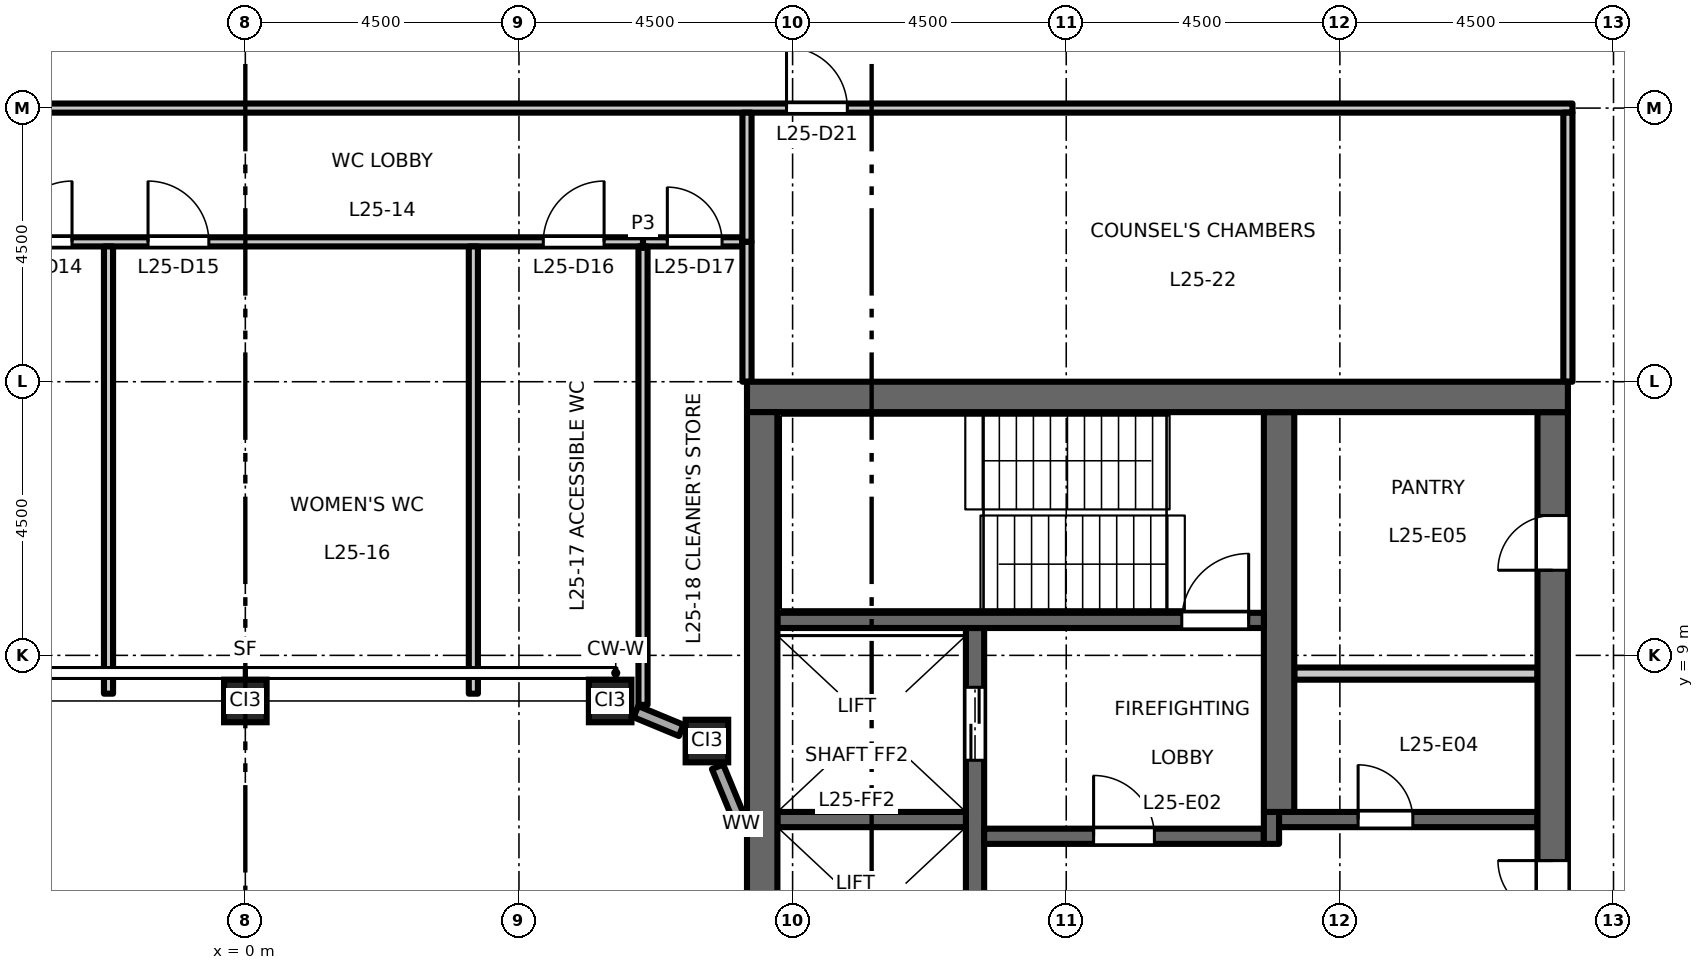
"""IFC4 building model, lengths in metres.
Left out: names, types, materials, properties, quantities, classifications, styles, units other than length and angle.
Written with IfcOpenShell. Run it as: python <this file> out.ifc"""

import sys

from ifc_helpers import new_model, si_unit, direction, frame, frame_2d, origin, origin_2d, place, context, subcontext, project, spatial, rectangle, hollow_rectangle, extrude, element, fill, save


model = new_model("IFC4")
c1 = context("Model", 3, precision=1e-05, world=origin(), true_north=direction((0.0, 1.0)))
c2 = subcontext(c1, "Body", "Model", "MODEL_VIEW")
j1 = project(units=[si_unit("LENGTHUNIT", "METRE"), si_unit("PLANEANGLEUNIT", "RADIAN")], contexts=[c1])
p1 = place(None, origin())
s1 = spatial("IfcSite", under=j1, at=p1, CompositionType="ELEMENT")
p2 = place(p1, origin())
s2 = spatial("IfcBuilding", under=s1, at=p2, CompositionType="ELEMENT")
p3 = place(p2, frame((0.0, 0.0, 118.2)))
s3 = spatial("IfcBuildingStorey", under=s2, at=p3, CompositionType="ELEMENT", Elevation=118.2)
for number, where, z_axis, x_axis in (
    (1, (0.0, 8.25, 0.0), (0.0, 0.0, 1.0), (1.0, 0.0, 0.0)),
    (2, (6.0, 8.25, 0.0), (0.0, 0.0, 1.0), (1.0, 0.0, 0.0)),
    (3, (7.591, 7.591, 0.0), (0.0, 0.0, 1.0), (1.0, 0.0, 0.0)),
):
    element("IfcColumn", number, at=place(p3, frame(where, z_axis=z_axis, x_axis=x_axis)), inside=s3, PredefinedType="COLUMN", context=c2, shape_type="SweptSolid", body=[
        extrude(hollow_rectangle(XDim=0.7, YDim=0.7, WallThickness=0.04, at=origin_2d()), origin(), (0.0, 0.0, 1.0), 4.5),
    ])
p4 = place(p3, frame((12.0, -9.45, 0.0), z_axis=(0.0, 0.0, 1.0), x_axis=(0.0, 1.0, 0.0)))
e4 = element("IfcWall", 4, at=p4, inside=s3, PredefinedType="SHEAR", context=c2, shape_type="SweptSolid", body=[
    extrude(rectangle(XDim=18.9, YDim=0.3, at=frame_2d((9.45, 0.0))), origin(), (0.0, 0.0, 1.0), 4.35),
])
p5 = place(p4, frame((3.625, 0.0, 0.0)))
e5 = element("IfcOpeningElement", 5, at=p5, cuts=e4, PredefinedType="OPENING", context=c2, shape_type="SweptSolid", body=[
    extrude(rectangle(XDim=1.1, YDim=2.1, at=frame_2d((0.55, 1.05))), frame((0.0, 0.16, 0.0), z_axis=(0.0, -1.0, 0.0), x_axis=(1.0, 0.0, 0.0)), (0.0, 0.0, 1.0), 0.32),
])
p6 = place(p4, frame((6.775, 0.0, 0.0)))
e6 = element("IfcOpeningElement", 6, at=p6, cuts=e4, PredefinedType="OPENING", context=c2, shape_type="SweptSolid", body=[
    extrude(rectangle(XDim=1.1, YDim=2.1, at=frame_2d((0.55, 1.05))), frame((0.0, 0.16, 0.0), z_axis=(0.0, -1.0, 0.0), x_axis=(1.0, 0.0, 0.0)), (0.0, 0.0, 1.0), 0.32),
])
p7 = place(p4, frame((9.925, 0.0, 0.0)))
e7 = element("IfcOpeningElement", 7, at=p7, cuts=e4, PredefinedType="OPENING", context=c2, shape_type="SweptSolid", body=[
    extrude(rectangle(XDim=1.1, YDim=2.1, at=frame_2d((0.55, 1.05))), frame((0.0, 0.16, 0.0), z_axis=(0.0, -1.0, 0.0), x_axis=(1.0, 0.0, 0.0)), (0.0, 0.0, 1.0), 0.32),
])
p8 = place(p4, frame((13.075, 0.0, 0.0)))
e8 = element("IfcOpeningElement", 8, at=p8, cuts=e4, PredefinedType="OPENING", context=c2, shape_type="SweptSolid", body=[
    extrude(rectangle(XDim=1.1, YDim=2.1, at=frame_2d((0.55, 1.05))), frame((0.0, 0.16, 0.0), z_axis=(0.0, -1.0, 0.0), x_axis=(1.0, 0.0, 0.0)), (0.0, 0.0, 1.0), 0.32),
])
p9 = place(p4, frame((16.725, 0.0, 0.0)))
e9 = element("IfcOpeningElement", 9, at=p9, cuts=e4, PredefinedType="OPENING", context=c2, shape_type="SweptSolid", body=[
    extrude(rectangle(XDim=1.2, YDim=2.1, at=frame_2d((0.6, 1.05))), frame((0.0, 0.16, 0.0), z_axis=(0.0, -1.0, 0.0), x_axis=(1.0, 0.0, 0.0)), (0.0, 0.0, 1.0), 0.32),
])
p10 = place(p4, frame((0.975, 0.0, 0.0)))
e10 = element("IfcOpeningElement", 10, at=p10, cuts=e4, PredefinedType="OPENING", context=c2, shape_type="SweptSolid", body=[
    extrude(rectangle(XDim=1.2, YDim=2.1, at=frame_2d((0.6, 1.05))), frame((0.0, 0.16, 0.0), z_axis=(0.0, -1.0, 0.0), x_axis=(1.0, 0.0, 0.0)), (0.0, 0.0, 1.0), 0.32),
])
p11 = place(p3, frame((12.15, 6.025, 0.0), z_axis=(0.0, 0.0, 1.0), x_axis=(1.0, 0.0, 0.0)))
e11 = element("IfcWall", 11, at=p11, inside=s3, PredefinedType="SHEAR", context=c2, shape_type="SweptSolid", body=[
    extrude(rectangle(XDim=4.6, YDim=0.25, at=frame_2d((2.3, 0.0))), origin(), (0.0, 0.0, 1.0), 4.35),
])
p12 = place(p11, frame((1.8, 0.0, 0.0)))
e12 = element("IfcOpeningElement", 12, at=p12, cuts=e11, PredefinedType="OPENING", context=c2, shape_type="SweptSolid", body=[
    extrude(rectangle(XDim=1.0, YDim=2.1, at=frame_2d((0.5, 1.05))), frame((0.0, 0.135, 0.0), z_axis=(0.0, -1.0, 0.0), x_axis=(1.0, 0.0, 0.0)), (0.0, 0.0, 1.0), 0.27),
])
p13 = place(p3, frame((16.875, 5.9, 0.0), z_axis=(0.0, 0.0, 1.0), x_axis=(0.0, 1.0, 0.0)))
e13 = element("IfcWall", 13, at=p13, inside=s3, PredefinedType="SHEAR", context=c2, shape_type="SweptSolid", body=[
    extrude(rectangle(XDim=0.525, YDim=0.25, at=frame_2d((0.263, 0.0))), origin(), (0.0, 0.0, 1.0), 4.35),
])
p14 = place(p3, frame((17.0, 6.3, 0.0), z_axis=(0.0, 0.0, 1.0), x_axis=(1.0, 0.0, 0.0)))
e14 = element("IfcWall", 14, at=p14, inside=s3, PredefinedType="SHEAR", context=c2, shape_type="SweptSolid", body=[
    extrude(rectangle(XDim=4.25, YDim=0.25, at=frame_2d((2.125, 0.0))), origin(), (0.0, 0.0, 1.0), 4.35),
])
p15 = place(p14, frame((1.3, 0.0, 0.0)))
e15 = element("IfcOpeningElement", 15, at=p15, cuts=e14, PredefinedType="OPENING", context=c2, shape_type="SweptSolid", body=[
    extrude(rectangle(XDim=0.9, YDim=2.1, at=frame_2d((0.45, 1.05))), frame((0.0, 0.135, 0.0), z_axis=(0.0, -1.0, 0.0), x_axis=(1.0, 0.0, 0.0)), (0.0, 0.0, 1.0), 0.27),
])
p16 = place(p3, frame((21.5, -13.0, 0.0), z_axis=(0.0, 0.0, 1.0), x_axis=(0.0, 1.0, 0.0)))
e16 = element("IfcWall", 16, at=p16, inside=s3, PredefinedType="SHEAR", context=c2, shape_type="SweptSolid", body=[
    extrude(rectangle(XDim=26.0, YDim=0.5, at=frame_2d((13.0, 0.0))), origin(), (0.0, 0.0, 1.0), 4.35),
])
p17 = place(p16, frame((16.825, 0.0, 0.0)))
e17 = element("IfcOpeningElement", 17, at=p17, cuts=e16, PredefinedType="OPENING", context=c2, shape_type="SweptSolid", body=[
    extrude(rectangle(XDim=1.8, YDim=2.1, at=frame_2d((0.9, 1.05))), frame((0.0, 0.26, 0.0), z_axis=(0.0, -1.0, 0.0), x_axis=(1.0, 0.0, 0.0)), (0.0, 0.0, 1.0), 0.52),
])
p18 = place(p16, frame((7.375, 0.0, 0.0)))
e18 = element("IfcOpeningElement", 18, at=p18, cuts=e16, PredefinedType="OPENING", context=c2, shape_type="SweptSolid", body=[
    extrude(rectangle(XDim=1.8, YDim=2.1, at=frame_2d((0.9, 1.05))), frame((0.0, 0.26, 0.0), z_axis=(0.0, -1.0, 0.0), x_axis=(1.0, 0.0, 0.0)), (0.0, 0.0, 1.0), 0.52),
])
p19 = place(p16, frame((23.4, 0.0, 0.0)))
e19 = element("IfcOpeningElement", 19, at=p19, cuts=e16, PredefinedType="OPENING", context=c2, shape_type="SweptSolid", body=[
    extrude(rectangle(XDim=0.9, YDim=2.1, at=frame_2d((0.45, 1.05))), frame((0.0, 0.26, 0.0), z_axis=(0.0, -1.0, 0.0), x_axis=(1.0, 0.0, 0.0)), (0.0, 0.0, 1.0), 0.52),
])
p20 = place(p3, frame((17.25, 8.7, 0.0), z_axis=(0.0, 0.0, 1.0), x_axis=(1.0, 0.0, 0.0)))
e20 = element("IfcWall", 20, at=p20, inside=s3, PredefinedType="PARTITIONING", context=c2, shape_type="SweptSolid", body=[
    extrude(rectangle(XDim=4.0, YDim=0.2, at=frame_2d((2.0, 0.0))), origin(), (0.0, 0.0, 1.0), 4.35),
])
p21 = place(p3, frame((17.0, 6.425, 0.0), z_axis=(0.0, 0.0, 1.0), x_axis=(0.0, 1.0, 0.0)))
e21 = element("IfcWall", 21, at=p21, inside=s3, PredefinedType="SHEAR", context=c2, shape_type="SweptSolid", body=[
    extrude(rectangle(XDim=6.575, YDim=0.5, at=frame_2d((3.288, 0.0))), origin(), (0.0, 0.0, 1.0), 4.35),
])
p22 = place(p3, frame((8.75, 6.3, 0.0), z_axis=(0.0, 0.0, 1.0), x_axis=(1.0, 0.0, 0.0)))
e22 = element("IfcWall", 22, at=p22, inside=s3, PredefinedType="SHEAR", context=c2, shape_type="SweptSolid", body=[
    extrude(rectangle(XDim=3.1, YDim=0.25, at=frame_2d((1.55, 0.0))), origin(), (0.0, 0.0, 1.0), 4.35),
])
p23 = place(p3, frame((8.75, 9.575, 0.0), z_axis=(0.0, 0.0, 1.0), x_axis=(1.0, 0.0, 0.0)))
e23 = element("IfcWall", 23, at=p23, inside=s3, PredefinedType="SHEAR", context=c2, shape_type="SweptSolid", body=[
    extrude(rectangle(XDim=8.0, YDim=0.25, at=frame_2d((4.0, 0.0))), origin(), (0.0, 0.0, 1.0), 4.35),
])
p24 = place(p23, frame((6.65, 0.0, 0.0)))
e24 = element("IfcOpeningElement", 24, at=p24, cuts=e23, PredefinedType="OPENING", context=c2, shape_type="SweptSolid", body=[
    extrude(rectangle(XDim=1.1, YDim=2.1, at=frame_2d((0.55, 1.05))), frame((0.0, 0.135, 0.0), z_axis=(0.0, -1.0, 0.0), x_axis=(1.0, 0.0, 0.0)), (0.0, 0.0, 1.0), 0.27),
])
p25 = place(p3, frame((8.25, 13.25, 0.0), z_axis=(0.0, 0.0, 1.0), x_axis=(1.0, 0.0, 0.0)))
e25 = element("IfcWall", 25, at=p25, inside=s3, PredefinedType="SHEAR", context=c2, shape_type="SweptSolid", body=[
    extrude(rectangle(XDim=13.5, YDim=0.5, at=frame_2d((6.75, 0.0))), origin(), (0.0, 0.0, 1.0), 4.35),
])
p26 = place(p3, frame((8.5, -13.0, 0.0), z_axis=(0.0, 0.0, 1.0), x_axis=(0.0, 1.0, 0.0)))
e26 = element("IfcWall", 26, at=p26, inside=s3, PredefinedType="SHEAR", context=c2, shape_type="SweptSolid", body=[
    extrude(rectangle(XDim=26.0, YDim=0.5, at=frame_2d((13.0, 0.0))), origin(), (0.0, 0.0, 1.0), 4.35),
])
p27 = place(p3, frame((8.154, 6.231, 0.0), z_axis=(0.0, 0.0, 1.0), x_axis=(-0.382769662028, 0.923843810301, 0.0)))
e27 = element("IfcWall", 27, at=p27, inside=s3, PredefinedType="STANDARD", context=c2, shape_type="SweptSolid", body=[
    extrude(rectangle(XDim=1.015, YDim=0.2, at=frame_2d((0.507, 0.0))), origin(), (0.0, 0.0, 1.0), 3.826),
])
p28 = place(p3, frame((7.168, 7.766, 0.0), z_axis=(0.0, 0.0, 1.0), x_axis=(-0.923817771127, 0.382832503518, 0.0)))
e28 = element("IfcWall", 28, at=p28, inside=s3, PredefinedType="STANDARD", context=c2, shape_type="SweptSolid", body=[
    extrude(rectangle(XDim=0.807, YDim=0.2, at=frame_2d((0.404, 0.0))), origin(), (0.0, 0.0, 1.0), 3.826),
])
p29 = place(p3, frame((-8.175, 15.8, 0.0), z_axis=(0.0, 0.0, 1.0), x_axis=(1.0, 0.0, 0.0)))
e29 = element("IfcWall", 29, at=p29, inside=s3, PredefinedType="PARTITIONING", context=c2, shape_type="SweptSolid", body=[
    extrude(rectangle(XDim=14.715, YDim=0.15, at=frame_2d((7.357, 0.0))), origin(), (0.0, 0.0, 1.0), 4.35),
])
p30 = place(p29, frame((4.325, 0.0, 0.0)))
e30 = element("IfcOpeningElement", 30, at=p30, cuts=e29, PredefinedType="OPENING", context=c2, shape_type="SweptSolid", body=[
    extrude(rectangle(XDim=1.0, YDim=2.1, at=frame_2d((0.5, 1.05))), frame((0.0, 0.085, 0.0), z_axis=(0.0, -1.0, 0.0), x_axis=(1.0, 0.0, 0.0)), (0.0, 0.0, 1.0), 0.17),
])
p31 = place(p29, frame((6.575, 0.0, 0.0)))
e31 = element("IfcOpeningElement", 31, at=p31, cuts=e29, PredefinedType="OPENING", context=c2, shape_type="SweptSolid", body=[
    extrude(rectangle(XDim=1.0, YDim=2.1, at=frame_2d((0.5, 1.05))), frame((0.0, 0.085, 0.0), z_axis=(0.0, -1.0, 0.0), x_axis=(1.0, 0.0, 0.0)), (0.0, 0.0, 1.0), 0.17),
])
p32 = place(p29, frame((13.075, 0.0, 0.0)))
e32 = element("IfcOpeningElement", 32, at=p32, cuts=e29, PredefinedType="OPENING", context=c2, shape_type="SweptSolid", body=[
    extrude(rectangle(XDim=1.0, YDim=2.1, at=frame_2d((0.5, 1.05))), frame((0.0, 0.085, 0.0), z_axis=(0.0, -1.0, 0.0), x_axis=(1.0, 0.0, 0.0)), (0.0, 0.0, 1.0), 0.17),
])
p33 = place(p3, frame((6.54, 15.8, 0.0), z_axis=(0.0, 0.0, 1.0), x_axis=(1.0, 0.0, 0.0)))
e33 = element("IfcWall", 33, at=p33, inside=s3, PredefinedType="PARTITIONING", context=c2, shape_type="SweptSolid", body=[
    extrude(rectangle(XDim=1.635, YDim=0.15, at=frame_2d((0.817, 0.0))), origin(), (0.0, 0.0, 1.0), 4.35),
])
p34 = place(p33, frame((0.4, 0.0, 0.0)))
e34 = element("IfcOpeningElement", 34, at=p34, cuts=e33, PredefinedType="OPENING", context=c2, shape_type="SweptSolid", body=[
    extrude(rectangle(XDim=0.9, YDim=2.1, at=frame_2d((0.45, 1.05))), frame((0.0, 0.085, 0.0), z_axis=(0.0, -1.0, 0.0), x_axis=(1.0, 0.0, 0.0)), (0.0, 0.0, 1.0), 0.17),
])
p35 = place(p3, frame((-21.825, 18.0, 0.0), z_axis=(0.0, 0.0, 1.0), x_axis=(1.0, 0.0, 0.0)))
e35 = element("IfcWall", 35, at=p35, inside=s3, PredefinedType="PARTITIONING", context=c2, shape_type="SweptSolid", body=[
    extrude(rectangle(XDim=43.65, YDim=0.15, at=frame_2d((21.825, 0.0))), origin(), (0.0, 0.0, 1.0), 4.35),
])
p36 = place(p35, frame((14.225, 0.0, 0.0)))
e36 = element("IfcOpeningElement", 36, at=p36, cuts=e35, PredefinedType="OPENING", context=c2, shape_type="SweptSolid", body=[
    extrude(rectangle(XDim=1.0, YDim=2.1, at=frame_2d((0.5, 1.05))), frame((0.0, 0.085, 0.0), z_axis=(0.0, -1.0, 0.0), x_axis=(1.0, 0.0, 0.0)), (0.0, 0.0, 1.0), 0.17),
])
p37 = place(p35, frame((11.975, 0.0, 0.0)))
e37 = element("IfcOpeningElement", 37, at=p37, cuts=e35, PredefinedType="OPENING", context=c2, shape_type="SweptSolid", body=[
    extrude(rectangle(XDim=1.0, YDim=2.1, at=frame_2d((0.5, 1.05))), frame((0.0, 0.085, 0.0), z_axis=(0.0, -1.0, 0.0), x_axis=(1.0, 0.0, 0.0)), (0.0, 0.0, 1.0), 0.17),
])
p38 = place(p35, frame((30.725, 0.0, 0.0)))
e38 = element("IfcOpeningElement", 38, at=p38, cuts=e35, PredefinedType="OPENING", context=c2, shape_type="SweptSolid", body=[
    extrude(rectangle(XDim=1.0, YDim=2.1, at=frame_2d((0.5, 1.05))), frame((0.0, 0.085, 0.0), z_axis=(0.0, -1.0, 0.0), x_axis=(1.0, 0.0, 0.0)), (0.0, 0.0, 1.0), 0.17),
])
for number, where, z_axis, x_axis in (
    (39, (-2.25, 8.37, 0.0), (0.0, 0.0, 1.0), (0.0, 1.0, 0.0)),
    (40, (3.75, 8.37, 0.0), (0.0, 0.0, 1.0), (0.0, 1.0, 0.0)),
):
    element("IfcWall", number, at=place(p3, frame(where, z_axis=z_axis, x_axis=x_axis)), inside=s3, PredefinedType="PARTITIONING", context=c2, shape_type="SweptSolid", body=[
        extrude(rectangle(XDim=7.355, YDim=0.15, at=frame_2d((3.677, 0.0))), origin(), (0.0, 0.0, 1.0), 4.35),
    ])
p39 = place(p3, frame((6.54, 8.186, 0.0), z_axis=(0.0, 0.0, 1.0), x_axis=(0.0, 1.0, 0.0)))
e41 = element("IfcWall", 41, at=p39, inside=s3, PredefinedType="PARTITIONING", context=c2, shape_type="SweptSolid", body=[
    extrude(rectangle(XDim=7.539, YDim=0.15, at=frame_2d((3.77, 0.0))), origin(), (0.0, 0.0, 1.0), 4.35),
])
p40 = place(p3, frame((8.25, 15.8, 0.0), z_axis=(0.0, 0.0, 1.0), x_axis=(0.0, 1.0, 0.0)))
e42 = element("IfcWall", 42, at=p40, inside=s3, PredefinedType="PARTITIONING", context=c2, shape_type="SweptSolid", body=[
    extrude(rectangle(XDim=2.125, YDim=0.15, at=frame_2d((1.062, 0.0))), origin(), (0.0, 0.0, 1.0), 4.35),
])
p41 = place(p3, frame((8.25, 13.5, 0.0), z_axis=(0.0, 0.0, 1.0), x_axis=(0.0, 1.0, 0.0)))
e43 = element("IfcWall", 43, at=p41, inside=s3, PredefinedType="PARTITIONING", context=c2, shape_type="SweptSolid", body=[
    extrude(rectangle(XDim=2.3, YDim=0.15, at=frame_2d((1.15, 0.0))), origin(), (0.0, 0.0, 1.0), 4.35),
])
p42 = place(p3, frame((21.75, 13.5, 0.0), z_axis=(0.0, 0.0, 1.0), x_axis=(0.0, 1.0, 0.0)))
e44 = element("IfcWall", 44, at=p42, inside=s3, PredefinedType="PARTITIONING", context=c2, shape_type="SweptSolid", body=[
    extrude(rectangle(XDim=4.425, YDim=0.15, at=frame_2d((2.212, 0.0))), origin(), (0.0, 0.0, 1.0), 4.35),
])
p43 = place(p12, origin())
e45 = element("IfcDoor", 45, at=p43, inside=s3, OperationType="SINGLE_SWING_RIGHT", PredefinedType="DOOR", context=c2, shape_type="SweptSolid", body=[
    extrude(rectangle(XDim=1.0, YDim=2.1, at=frame_2d((0.5, 1.05))), frame((0.0, 0.025, 0.0), z_axis=(0.0, -1.0, 0.0), x_axis=(1.0, 0.0, 0.0)), (0.0, 0.0, 1.0), 0.05),
])
fill(e12, e45)
p44 = place(p24, origin())
e46 = element("IfcDoor", 46, at=p44, inside=s3, OperationType="SINGLE_SWING_LEFT", PredefinedType="DOOR", context=c2, shape_type="SweptSolid", body=[
    extrude(rectangle(XDim=1.1, YDim=2.1, at=frame_2d((0.55, 1.05))), frame((0.0, 0.025, 0.0), z_axis=(0.0, -1.0, 0.0), x_axis=(1.0, 0.0, 0.0)), (0.0, 0.0, 1.0), 0.05),
])
fill(e24, e46)
p45 = place(p17, origin())
e47 = element("IfcDoor", 47, at=p45, inside=s3, OperationType="DOUBLE_DOOR_DOUBLE_SWING", PredefinedType="DOOR", context=c2, shape_type="SweptSolid", body=[
    extrude(rectangle(XDim=1.8, YDim=2.1, at=frame_2d((0.9, 1.05))), frame((0.0, 0.025, 0.0), z_axis=(0.0, -1.0, 0.0), x_axis=(1.0, 0.0, 0.0)), (0.0, 0.0, 1.0), 0.05),
])
fill(e17, e47)
p46 = place(p9, origin())
e48 = element("IfcDoor", 48, at=p46, inside=s3, OperationType="DOUBLE_DOOR_SLIDING", PredefinedType="DOOR", context=c2, shape_type="SweptSolid", body=[
    extrude(rectangle(XDim=1.2, YDim=2.1, at=frame_2d((0.6, 1.05))), frame((0.0, 0.025, 0.0), z_axis=(0.0, -1.0, 0.0), x_axis=(1.0, 0.0, 0.0)), (0.0, 0.0, 1.0), 0.05),
])
fill(e9, e48)
p47 = place(p15, origin())
e49 = element("IfcDoor", 49, at=p47, inside=s3, OperationType="SINGLE_SWING_RIGHT", PredefinedType="DOOR", context=c2, shape_type="SweptSolid", body=[
    extrude(rectangle(XDim=0.9, YDim=2.1, at=frame_2d((0.45, 1.05))), frame((0.0, 0.025, 0.0), z_axis=(0.0, -1.0, 0.0), x_axis=(1.0, 0.0, 0.0)), (0.0, 0.0, 1.0), 0.05),
])
fill(e15, e49)
p48 = place(p19, origin())
e50 = element("IfcDoor", 50, at=p48, inside=s3, OperationType="SINGLE_SWING_RIGHT", PredefinedType="DOOR", context=c2, shape_type="SweptSolid", body=[
    extrude(rectangle(XDim=0.9, YDim=2.1, at=frame_2d((0.45, 1.05))), frame((0.0, 0.025, 0.0), z_axis=(0.0, -1.0, 0.0), x_axis=(1.0, 0.0, 0.0)), (0.0, 0.0, 1.0), 0.05),
])
fill(e19, e50)
p49 = place(p30, origin())
e51 = element("IfcDoor", 51, at=p49, inside=s3, OperationType="SINGLE_SWING_RIGHT", PredefinedType="DOOR", context=c2, shape_type="SweptSolid", body=[
    extrude(rectangle(XDim=1.0, YDim=2.1, at=frame_2d((0.5, 1.05))), frame((0.0, 0.025, 0.0), z_axis=(0.0, -1.0, 0.0), x_axis=(1.0, 0.0, 0.0)), (0.0, 0.0, 1.0), 0.05),
])
fill(e30, e51)
p50 = place(p31, origin())
e52 = element("IfcDoor", 52, at=p50, inside=s3, OperationType="SINGLE_SWING_LEFT", PredefinedType="DOOR", context=c2, shape_type="SweptSolid", body=[
    extrude(rectangle(XDim=1.0, YDim=2.1, at=frame_2d((0.5, 1.05))), frame((0.0, 0.025, 0.0), z_axis=(0.0, -1.0, 0.0), x_axis=(1.0, 0.0, 0.0)), (0.0, 0.0, 1.0), 0.05),
])
fill(e31, e52)
p51 = place(p32, origin())
e53 = element("IfcDoor", 53, at=p51, inside=s3, OperationType="SINGLE_SWING_RIGHT", PredefinedType="DOOR", context=c2, shape_type="SweptSolid", body=[
    extrude(rectangle(XDim=1.0, YDim=2.1, at=frame_2d((0.5, 1.05))), frame((0.0, 0.025, 0.0), z_axis=(0.0, -1.0, 0.0), x_axis=(1.0, 0.0, 0.0)), (0.0, 0.0, 1.0), 0.05),
])
fill(e32, e53)
p52 = place(p34, origin())
e54 = element("IfcDoor", 54, at=p52, inside=s3, OperationType="SINGLE_SWING_LEFT", PredefinedType="DOOR", context=c2, shape_type="SweptSolid", body=[
    extrude(rectangle(XDim=0.9, YDim=2.1, at=frame_2d((0.45, 1.05))), frame((0.0, 0.025, 0.0), z_axis=(0.0, -1.0, 0.0), x_axis=(1.0, 0.0, 0.0)), (0.0, 0.0, 1.0), 0.05),
])
fill(e34, e54)
p53 = place(p38, origin())
e55 = element("IfcDoor", 55, at=p53, inside=s3, OperationType="SINGLE_SWING_LEFT", PredefinedType="DOOR", context=c2, shape_type="SweptSolid", body=[
    extrude(rectangle(XDim=1.0, YDim=2.1, at=frame_2d((0.5, 1.05))), frame((0.0, 0.025, 0.0), z_axis=(0.0, -1.0, 0.0), x_axis=(1.0, 0.0, 0.0)), (0.0, 0.0, 1.0), 0.05),
])
fill(e38, e55)
save(model, sys.argv[1])
